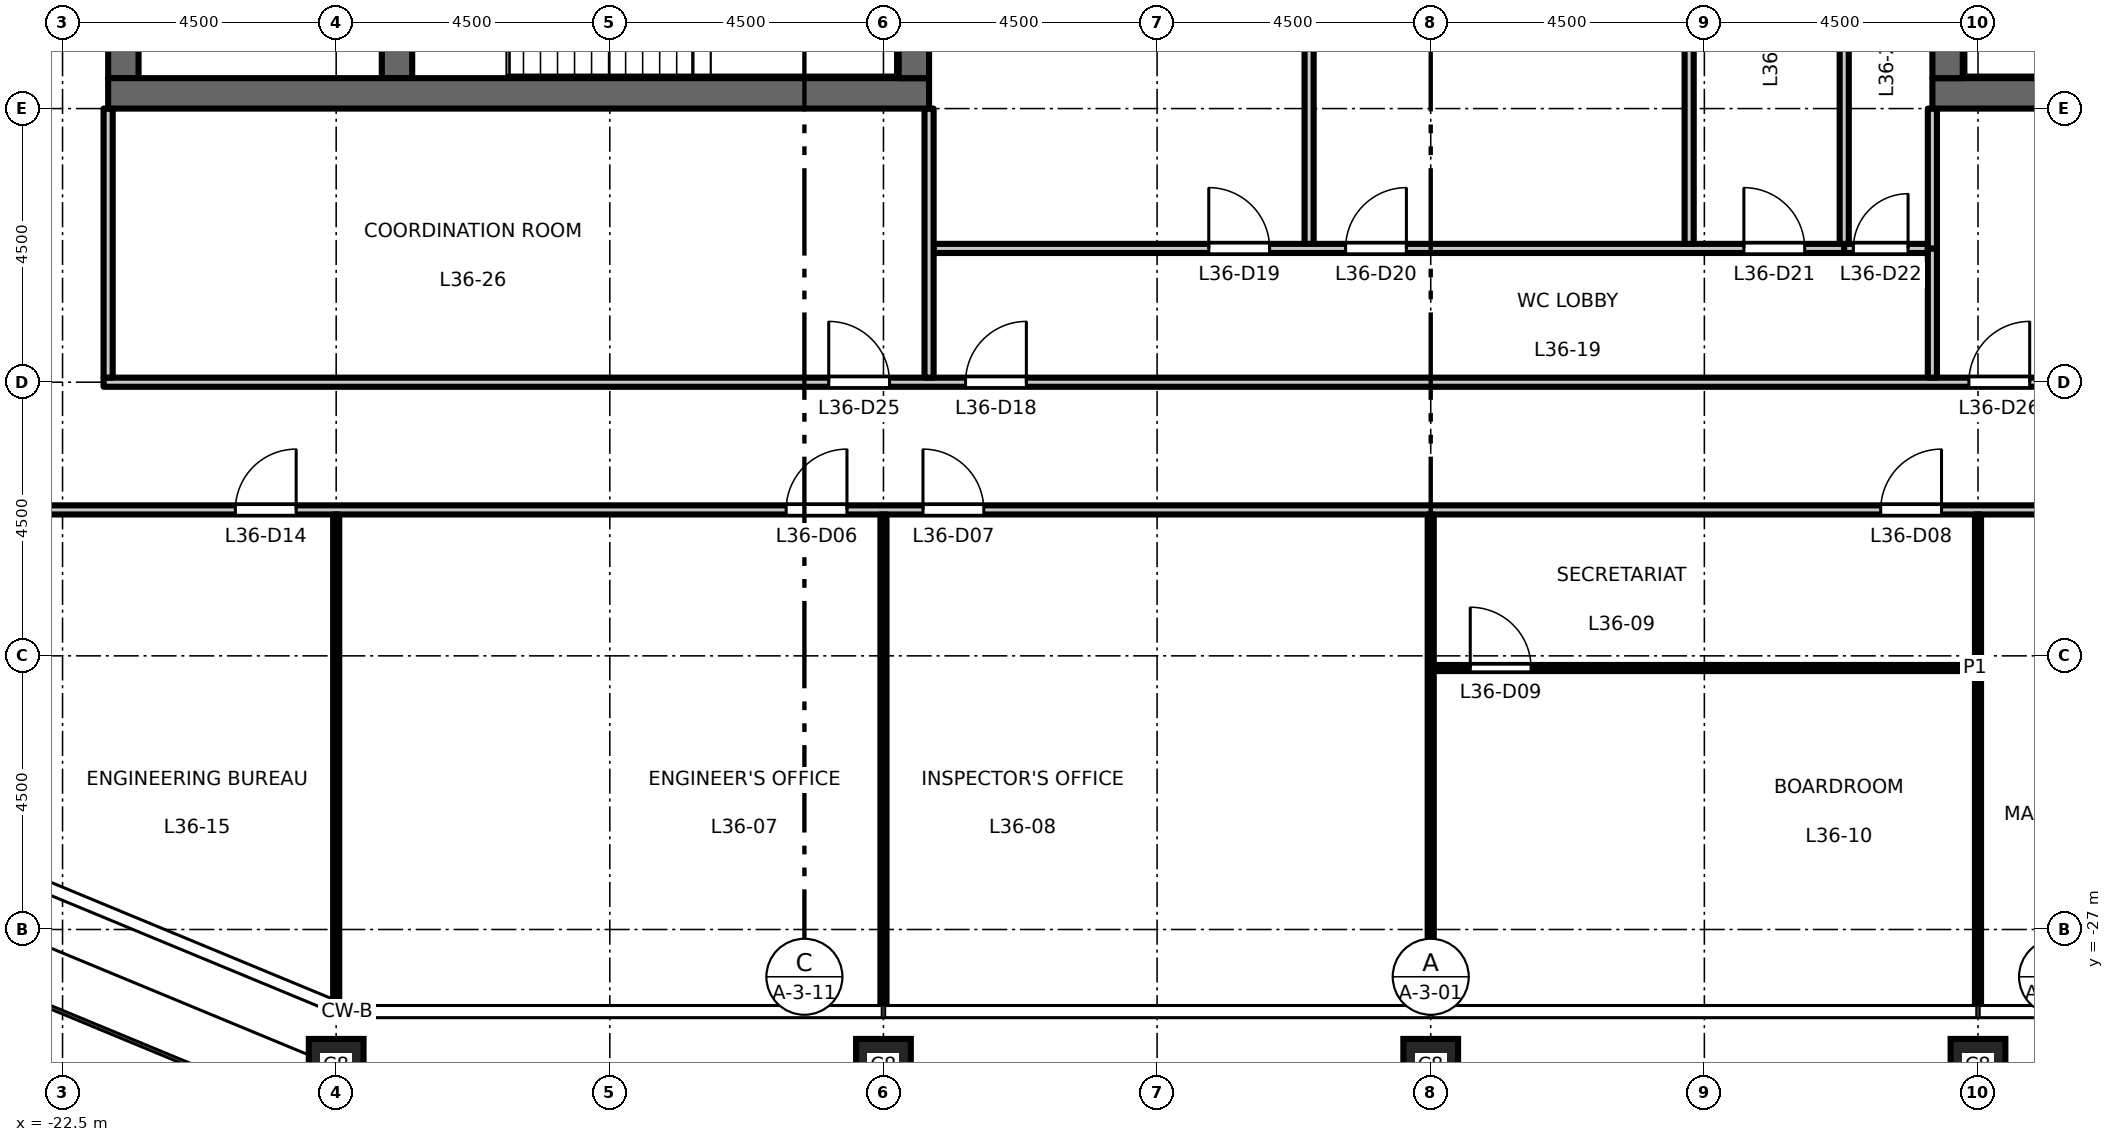
"""IFC4 building model, lengths in metres.
Left out: names, types, materials, properties, quantities, classifications, styles, units other than length and angle.
Written with IfcOpenShell. Run it as: python <this file> out.ifc"""

import sys

from ifc_helpers import new_model, si_unit, direction, frame, frame_2d, origin, origin_2d, place, context, subcontext, project, spatial, rectangle, hollow_rectangle, extrude, element, fill, save


model = new_model("IFC4")
c1 = context("Model", 3, precision=1e-05, world=origin(), true_north=direction((0.0, 1.0)))
c2 = subcontext(c1, "Body", "Model", "MODEL_VIEW")
j1 = project(units=[si_unit("LENGTHUNIT", "METRE"), si_unit("PLANEANGLEUNIT", "RADIAN")], contexts=[c1])
p1 = place(None, origin())
s1 = spatial("IfcSite", under=j1, at=p1, CompositionType="ELEMENT")
p2 = place(p1, origin())
s2 = spatial("IfcBuilding", under=s1, at=p2, CompositionType="ELEMENT")
p3 = place(p2, frame((0.0, 0.0, 167.7)))
s3 = spatial("IfcBuildingStorey", under=s2, at=p3, CompositionType="ELEMENT", Elevation=167.7)
for number, where, z_axis, x_axis in (
    (1, (-18.0, -29.25, 0.0), (0.0, 0.0, 1.0), (1.0, 0.0, 0.0)),
    (2, (-9.0, -29.25, 0.0), (0.0, 0.0, 1.0), (1.0, 0.0, 0.0)),
    (3, (0.0, -29.25, 0.0), (0.0, 0.0, 1.0), (1.0, 0.0, 0.0)),
    (4, (9.0, -29.25, 0.0), (0.0, 0.0, 1.0), (1.0, 0.0, 0.0)),
):
    element("IfcColumn", number, at=place(p3, frame(where, z_axis=z_axis, x_axis=x_axis)), inside=s3, PredefinedType="COLUMN", context=c2, shape_type="SweptSolid", body=[
        extrude(hollow_rectangle(XDim=0.9, YDim=0.9, WallThickness=0.05, at=origin_2d()), origin(), (0.0, 0.0, 1.0), 4.5),
    ])
p4 = place(p3, frame((-21.5, -13.0, 0.0), z_axis=(0.0, 0.0, 1.0), x_axis=(0.0, 1.0, 0.0)))
e5 = element("IfcWall", 5, at=p4, inside=s3, PredefinedType="SHEAR", context=c2, shape_type="SweptSolid", body=[
    extrude(rectangle(XDim=26.0, YDim=0.5, at=frame_2d((13.0, 0.0))), origin(), (0.0, 0.0, 1.0), 4.35),
])
p5 = place(p4, frame((16.825, 0.0, 0.0)))
e6 = element("IfcOpeningElement", 6, at=p5, cuts=e5, PredefinedType="OPENING", context=c2, shape_type="SweptSolid", body=[
    extrude(rectangle(XDim=1.8, YDim=2.1, at=frame_2d((0.9, 1.05))), frame((0.0, 0.26, 0.0), z_axis=(0.0, -1.0, 0.0), x_axis=(1.0, 0.0, 0.0)), (0.0, 0.0, 1.0), 0.52),
])
p6 = place(p4, frame((7.375, 0.0, 0.0)))
e7 = element("IfcOpeningElement", 7, at=p6, cuts=e5, PredefinedType="OPENING", context=c2, shape_type="SweptSolid", body=[
    extrude(rectangle(XDim=1.8, YDim=2.1, at=frame_2d((0.9, 1.05))), frame((0.0, 0.26, 0.0), z_axis=(0.0, -1.0, 0.0), x_axis=(1.0, 0.0, 0.0)), (0.0, 0.0, 1.0), 0.52),
])
p7 = place(p4, frame((2.65, 0.0, 0.0)))
e8 = element("IfcOpeningElement", 8, at=p7, cuts=e5, PredefinedType="OPENING", context=c2, shape_type="SweptSolid", body=[
    extrude(rectangle(XDim=0.9, YDim=2.1, at=frame_2d((0.45, 1.05))), frame((0.0, 0.26, 0.0), z_axis=(0.0, -1.0, 0.0), x_axis=(1.0, 0.0, 0.0)), (0.0, 0.0, 1.0), 0.52),
])
p8 = place(p3, frame((-17.0, -13.0, 0.0), z_axis=(0.0, 0.0, 1.0), x_axis=(0.0, 1.0, 0.0)))
e9 = element("IfcWall", 9, at=p8, inside=s3, PredefinedType="SHEAR", context=c2, shape_type="SweptSolid", body=[
    extrude(rectangle(XDim=6.575, YDim=0.5, at=frame_2d((3.288, 0.0))), origin(), (0.0, 0.0, 1.0), 4.35),
])
p9 = place(p3, frame((-8.25, -13.25, 0.0), z_axis=(0.0, 0.0, 1.0), x_axis=(-1.0, 0.0, 0.0)))
e10 = element("IfcWall", 10, at=p9, inside=s3, PredefinedType="SHEAR", context=c2, shape_type="SweptSolid", body=[
    extrude(rectangle(XDim=13.5, YDim=0.5, at=frame_2d((6.75, 0.0))), origin(), (0.0, 0.0, 1.0), 4.35),
])
p10 = place(p3, frame((-8.5, -13.0, 0.0), z_axis=(0.0, 0.0, 1.0), x_axis=(0.0, 1.0, 0.0)))
e11 = element("IfcWall", 11, at=p10, inside=s3, PredefinedType="SHEAR", context=c2, shape_type="SweptSolid", body=[
    extrude(rectangle(XDim=26.0, YDim=0.5, at=frame_2d((13.0, 0.0))), origin(), (0.0, 0.0, 1.0), 4.35),
])
p11 = place(p3, frame((8.25, -13.25, 0.0), z_axis=(0.0, 0.0, 1.0), x_axis=(1.0, 0.0, 0.0)))
e12 = element("IfcWall", 12, at=p11, inside=s3, PredefinedType="SHEAR", context=c2, shape_type="SweptSolid", body=[
    extrude(rectangle(XDim=13.5, YDim=0.5, at=frame_2d((6.75, 0.0))), origin(), (0.0, 0.0, 1.0), 4.35),
])
p12 = place(p3, frame((8.5, -13.0, 0.0), z_axis=(0.0, 0.0, 1.0), x_axis=(0.0, 1.0, 0.0)))
e13 = element("IfcWall", 13, at=p12, inside=s3, PredefinedType="SHEAR", context=c2, shape_type="SweptSolid", body=[
    extrude(rectangle(XDim=26.0, YDim=0.5, at=frame_2d((13.0, 0.0))), origin(), (0.0, 0.0, 1.0), 4.35),
])
p13 = place(p3, frame((0.05, -22.7, 0.0), z_axis=(0.0, 0.0, 1.0), x_axis=(1.0, 0.0, 0.0)))
e14 = element("IfcWall", 14, at=p13, inside=s3, PredefinedType="PARTITIONING", context=c2, shape_type="SweptSolid", body=[
    extrude(rectangle(XDim=8.9, YDim=0.1, at=frame_2d((4.45, 0.0))), origin(), (0.0, 0.0, 1.0), 4.35),
])
p14 = place(p13, frame((0.6, 0.0, 0.0)))
e15 = element("IfcOpeningElement", 15, at=p14, cuts=e14, PredefinedType="OPENING", context=c2, shape_type="SweptSolid", body=[
    extrude(rectangle(XDim=1.0, YDim=2.1, at=frame_2d((0.5, 1.05))), frame((0.0, 0.06, 0.0), z_axis=(0.0, -1.0, 0.0), x_axis=(1.0, 0.0, 0.0)), (0.0, 0.0, 1.0), 0.12),
])
p15 = place(p3, frame((-27.308, -20.1, 0.0), z_axis=(0.0, 0.0, 1.0), x_axis=(1.0, 0.0, 0.0)))
e16 = element("IfcWall", 16, at=p15, inside=s3, PredefinedType="PARTITIONING", context=c2, shape_type="SweptSolid", body=[
    extrude(rectangle(XDim=54.616, YDim=0.15, at=frame_2d((27.308, 0.0))), origin(), (0.0, 0.0, 1.0), 4.35),
])
p16 = place(p15, frame((16.708, 0.0, 0.0)))
e17 = element("IfcOpeningElement", 17, at=p16, cuts=e16, PredefinedType="OPENING", context=c2, shape_type="SweptSolid", body=[
    extrude(rectangle(XDim=1.0, YDim=2.1, at=frame_2d((0.5, 1.05))), frame((0.0, 0.085, 0.0), z_axis=(0.0, -1.0, 0.0), x_axis=(1.0, 0.0, 0.0)), (0.0, 0.0, 1.0), 0.17),
])
p17 = place(p15, frame((18.958, 0.0, 0.0)))
e18 = element("IfcOpeningElement", 18, at=p17, cuts=e16, PredefinedType="OPENING", context=c2, shape_type="SweptSolid", body=[
    extrude(rectangle(XDim=1.0, YDim=2.1, at=frame_2d((0.5, 1.05))), frame((0.0, 0.085, 0.0), z_axis=(0.0, -1.0, 0.0), x_axis=(1.0, 0.0, 0.0)), (0.0, 0.0, 1.0), 0.17),
])
p18 = place(p15, frame((34.708, 0.0, 0.0)))
e19 = element("IfcOpeningElement", 19, at=p18, cuts=e16, PredefinedType="OPENING", context=c2, shape_type="SweptSolid", body=[
    extrude(rectangle(XDim=1.0, YDim=2.1, at=frame_2d((0.5, 1.05))), frame((0.0, 0.085, 0.0), z_axis=(0.0, -1.0, 0.0), x_axis=(1.0, 0.0, 0.0)), (0.0, 0.0, 1.0), 0.17),
])
p19 = place(p15, frame((43.708, 0.0, 0.0)))
e20 = element("IfcOpeningElement", 20, at=p19, cuts=e16, PredefinedType="OPENING", context=c2, shape_type="SweptSolid", body=[
    extrude(rectangle(XDim=1.0, YDim=2.1, at=frame_2d((0.5, 1.05))), frame((0.0, 0.085, 0.0), z_axis=(0.0, -1.0, 0.0), x_axis=(1.0, 0.0, 0.0)), (0.0, 0.0, 1.0), 0.17),
])
p20 = place(p15, frame((7.65, 0.0, 0.0)))
e21 = element("IfcOpeningElement", 21, at=p20, cuts=e16, PredefinedType="OPENING", context=c2, shape_type="SweptSolid", body=[
    extrude(rectangle(XDim=1.0, YDim=2.1, at=frame_2d((0.5, 1.05))), frame((0.0, 0.085, 0.0), z_axis=(0.0, -1.0, 0.0), x_axis=(1.0, 0.0, 0.0)), (0.0, 0.0, 1.0), 0.17),
])
p21 = place(p15, frame((45.958, 0.0, 0.0)))
e22 = element("IfcOpeningElement", 22, at=p21, cuts=e16, PredefinedType="OPENING", context=c2, shape_type="SweptSolid", body=[
    extrude(rectangle(XDim=1.0, YDim=2.1, at=frame_2d((0.5, 1.05))), frame((0.0, 0.085, 0.0), z_axis=(0.0, -1.0, 0.0), x_axis=(1.0, 0.0, 0.0)), (0.0, 0.0, 1.0), 0.17),
])
p22 = place(p3, frame((-21.825, -18.0, 0.0), z_axis=(0.0, 0.0, 1.0), x_axis=(1.0, 0.0, 0.0)))
e23 = element("IfcWall", 23, at=p22, inside=s3, PredefinedType="PARTITIONING", context=c2, shape_type="SweptSolid", body=[
    extrude(rectangle(XDim=43.65, YDim=0.15, at=frame_2d((21.825, 0.0))), origin(), (0.0, 0.0, 1.0), 4.35),
])
p23 = place(p22, frame((14.175, 0.0, 0.0)))
e24 = element("IfcOpeningElement", 24, at=p23, cuts=e23, PredefinedType="OPENING", context=c2, shape_type="SweptSolid", body=[
    extrude(rectangle(XDim=1.0, YDim=2.1, at=frame_2d((0.5, 1.05))), frame((0.0, 0.085, 0.0), z_axis=(0.0, -1.0, 0.0), x_axis=(1.0, 0.0, 0.0)), (0.0, 0.0, 1.0), 0.17),
])
p24 = place(p22, frame((11.925, 0.0, 0.0)))
e25 = element("IfcOpeningElement", 25, at=p24, cuts=e23, PredefinedType="OPENING", context=c2, shape_type="SweptSolid", body=[
    extrude(rectangle(XDim=1.0, YDim=2.1, at=frame_2d((0.5, 1.05))), frame((0.0, 0.085, 0.0), z_axis=(0.0, -1.0, 0.0), x_axis=(1.0, 0.0, 0.0)), (0.0, 0.0, 1.0), 0.17),
])
p25 = place(p22, frame((30.675, 0.0, 0.0)))
e26 = element("IfcOpeningElement", 26, at=p25, cuts=e23, PredefinedType="OPENING", context=c2, shape_type="SweptSolid", body=[
    extrude(rectangle(XDim=1.0, YDim=2.1, at=frame_2d((0.5, 1.05))), frame((0.0, 0.085, 0.0), z_axis=(0.0, -1.0, 0.0), x_axis=(1.0, 0.0, 0.0)), (0.0, 0.0, 1.0), 0.17),
])
p26 = place(p3, frame((-8.175, -15.8, 0.0), z_axis=(0.0, 0.0, 1.0), x_axis=(1.0, 0.0, 0.0)))
e27 = element("IfcWall", 27, at=p26, inside=s3, PredefinedType="PARTITIONING", context=c2, shape_type="SweptSolid", body=[
    extrude(rectangle(XDim=14.975, YDim=0.15, at=frame_2d((7.488, 0.0))), origin(), (0.0, 0.0, 1.0), 4.35),
])
p27 = place(p26, frame((4.525, 0.0, 0.0)))
e28 = element("IfcOpeningElement", 28, at=p27, cuts=e27, PredefinedType="OPENING", context=c2, shape_type="SweptSolid", body=[
    extrude(rectangle(XDim=1.0, YDim=2.1, at=frame_2d((0.5, 1.05))), frame((0.0, 0.085, 0.0), z_axis=(0.0, -1.0, 0.0), x_axis=(1.0, 0.0, 0.0)), (0.0, 0.0, 1.0), 0.17),
])
p28 = place(p26, frame((6.775, 0.0, 0.0)))
e29 = element("IfcOpeningElement", 29, at=p28, cuts=e27, PredefinedType="OPENING", context=c2, shape_type="SweptSolid", body=[
    extrude(rectangle(XDim=1.0, YDim=2.1, at=frame_2d((0.5, 1.05))), frame((0.0, 0.085, 0.0), z_axis=(0.0, -1.0, 0.0), x_axis=(1.0, 0.0, 0.0)), (0.0, 0.0, 1.0), 0.17),
])
p29 = place(p26, frame((13.325, 0.0, 0.0)))
e30 = element("IfcOpeningElement", 30, at=p29, cuts=e27, PredefinedType="OPENING", context=c2, shape_type="SweptSolid", body=[
    extrude(rectangle(XDim=1.0, YDim=2.1, at=frame_2d((0.5, 1.05))), frame((0.0, 0.085, 0.0), z_axis=(0.0, -1.0, 0.0), x_axis=(1.0, 0.0, 0.0)), (0.0, 0.0, 1.0), 0.17),
])
p30 = place(p3, frame((6.8, -15.8, 0.0), z_axis=(0.0, 0.0, 1.0), x_axis=(1.0, 0.0, 0.0)))
e31 = element("IfcWall", 31, at=p30, inside=s3, PredefinedType="PARTITIONING", context=c2, shape_type="SweptSolid", body=[
    extrude(rectangle(XDim=1.375, YDim=0.15, at=frame_2d((0.688, 0.0))), origin(), (0.0, 0.0, 1.0), 4.35),
])
p31 = place(p30, frame((0.15, 0.0, 0.0)))
e32 = element("IfcOpeningElement", 32, at=p31, cuts=e31, PredefinedType="OPENING", context=c2, shape_type="SweptSolid", body=[
    extrude(rectangle(XDim=0.9, YDim=2.1, at=frame_2d((0.45, 1.05))), frame((0.0, 0.085, 0.0), z_axis=(0.0, -1.0, 0.0), x_axis=(1.0, 0.0, 0.0)), (0.0, 0.0, 1.0), 0.17),
])
p32 = place(p3, frame((-21.75, -17.925, 0.0), z_axis=(0.0, 0.0, 1.0), x_axis=(0.0, 1.0, 0.0)))
e33 = element("IfcWall", 33, at=p32, inside=s3, PredefinedType="PARTITIONING", context=c2, shape_type="SweptSolid", body=[
    extrude(rectangle(XDim=4.425, YDim=0.15, at=frame_2d((2.212, 0.0))), origin(), (0.0, 0.0, 1.0), 4.35),
])
p33 = place(p3, frame((-18.0, -28.178, 0.0), z_axis=(0.0, 0.0, 1.0), x_axis=(0.0, 1.0, 0.0)))
e34 = element("IfcWall", 34, at=p33, inside=s3, PredefinedType="PARTITIONING", context=c2, shape_type="SweptSolid", body=[
    extrude(rectangle(XDim=8.003, YDim=0.1, at=frame_2d((4.001, 0.0))), origin(), (0.0, 0.0, 1.0), 3.45),
])
p34 = place(p3, frame((-9.0, -28.26, 0.0), z_axis=(0.0, 0.0, 1.0), x_axis=(0.0, 1.0, 0.0)))
e35 = element("IfcWall", 35, at=p34, inside=s3, PredefinedType="PARTITIONING", context=c2, shape_type="SweptSolid", body=[
    extrude(rectangle(XDim=8.085, YDim=0.1, at=frame_2d((4.042, 0.0))), origin(), (0.0, 0.0, 1.0), 3.45),
])
p35 = place(p3, frame((-8.25, -17.925, 0.0), z_axis=(0.0, 0.0, 1.0), x_axis=(0.0, 1.0, 0.0)))
e36 = element("IfcWall", 36, at=p35, inside=s3, PredefinedType="PARTITIONING", context=c2, shape_type="SweptSolid", body=[
    extrude(rectangle(XDim=4.425, YDim=0.15, at=frame_2d((2.212, 0.0))), origin(), (0.0, 0.0, 1.0), 4.35),
])
p36 = place(p3, frame((-2.0, -15.725, 0.0), z_axis=(0.0, 0.0, 1.0), x_axis=(0.0, 1.0, 0.0)))
e37 = element("IfcWall", 37, at=p36, inside=s3, PredefinedType="PARTITIONING", context=c2, shape_type="SweptSolid", body=[
    extrude(rectangle(XDim=7.355, YDim=0.15, at=frame_2d((3.677, 0.0))), origin(), (0.0, 0.0, 1.0), 4.35),
])
p37 = place(p3, frame((0.0, -28.26, 0.0), z_axis=(0.0, 0.0, 1.0), x_axis=(0.0, 1.0, 0.0)))
e38 = element("IfcWall", 38, at=p37, inside=s3, PredefinedType="PARTITIONING", context=c2, shape_type="SweptSolid", body=[
    extrude(rectangle(XDim=8.085, YDim=0.1, at=frame_2d((4.042, 0.0))), origin(), (0.0, 0.0, 1.0), 3.45),
])
p38 = place(p3, frame((4.25, -15.725, 0.0), z_axis=(0.0, 0.0, 1.0), x_axis=(0.0, 1.0, 0.0)))
e39 = element("IfcWall", 39, at=p38, inside=s3, PredefinedType="PARTITIONING", context=c2, shape_type="SweptSolid", body=[
    extrude(rectangle(XDim=7.355, YDim=0.15, at=frame_2d((3.677, 0.0))), origin(), (0.0, 0.0, 1.0), 4.35),
])
p39 = place(p3, frame((6.8, -15.725, 0.0), z_axis=(0.0, 0.0, 1.0), x_axis=(0.0, 1.0, 0.0)))
e40 = element("IfcWall", 40, at=p39, inside=s3, PredefinedType="PARTITIONING", context=c2, shape_type="SweptSolid", body=[
    extrude(rectangle(XDim=7.656, YDim=0.15, at=frame_2d((3.828, 0.0))), origin(), (0.0, 0.0, 1.0), 4.35),
])
p40 = place(p3, frame((8.25, -17.925, 0.0), z_axis=(0.0, 0.0, 1.0), x_axis=(0.0, 1.0, 0.0)))
e41 = element("IfcWall", 41, at=p40, inside=s3, PredefinedType="PARTITIONING", context=c2, shape_type="SweptSolid", body=[
    extrude(rectangle(XDim=2.125, YDim=0.15, at=frame_2d((1.062, 0.0))), origin(), (0.0, 0.0, 1.0), 4.35),
])
p41 = place(p3, frame((8.25, -15.8, 0.0), z_axis=(0.0, 0.0, 1.0), x_axis=(0.0, 1.0, 0.0)))
e42 = element("IfcWall", 42, at=p41, inside=s3, PredefinedType="PARTITIONING", context=c2, shape_type="SweptSolid", body=[
    extrude(rectangle(XDim=2.3, YDim=0.15, at=frame_2d((1.15, 0.0))), origin(), (0.0, 0.0, 1.0), 4.35),
])
p42 = place(p3, frame((9.0, -28.26, 0.0), z_axis=(0.0, 0.0, 1.0), x_axis=(0.0, 1.0, 0.0)))
e43 = element("IfcWall", 43, at=p42, inside=s3, PredefinedType="PARTITIONING", context=c2, shape_type="SweptSolid", body=[
    extrude(rectangle(XDim=8.085, YDim=0.1, at=frame_2d((4.042, 0.0))), origin(), (0.0, 0.0, 1.0), 3.45),
])
p43 = place(p16, origin())
e44 = element("IfcDoor", 44, at=p43, inside=s3, OperationType="SINGLE_SWING_RIGHT", PredefinedType="DOOR", context=c2, shape_type="SweptSolid", body=[
    extrude(rectangle(XDim=1.0, YDim=2.1, at=frame_2d((0.5, 1.05))), frame((0.0, 0.025, 0.0), z_axis=(0.0, -1.0, 0.0), x_axis=(1.0, 0.0, 0.0)), (0.0, 0.0, 1.0), 0.05),
])
fill(e17, e44)
p44 = place(p17, origin())
e45 = element("IfcDoor", 45, at=p44, inside=s3, OperationType="SINGLE_SWING_LEFT", PredefinedType="DOOR", context=c2, shape_type="SweptSolid", body=[
    extrude(rectangle(XDim=1.0, YDim=2.1, at=frame_2d((0.5, 1.05))), frame((0.0, 0.025, 0.0), z_axis=(0.0, -1.0, 0.0), x_axis=(1.0, 0.0, 0.0)), (0.0, 0.0, 1.0), 0.05),
])
fill(e18, e45)
p45 = place(p18, origin())
e46 = element("IfcDoor", 46, at=p45, inside=s3, OperationType="SINGLE_SWING_RIGHT", PredefinedType="DOOR", context=c2, shape_type="SweptSolid", body=[
    extrude(rectangle(XDim=1.0, YDim=2.1, at=frame_2d((0.5, 1.05))), frame((0.0, 0.025, 0.0), z_axis=(0.0, -1.0, 0.0), x_axis=(1.0, 0.0, 0.0)), (0.0, 0.0, 1.0), 0.05),
])
fill(e19, e46)
p46 = place(p14, origin())
e47 = element("IfcDoor", 47, at=p46, inside=s3, OperationType="SINGLE_SWING_LEFT", PredefinedType="DOOR", context=c2, shape_type="SweptSolid", body=[
    extrude(rectangle(XDim=1.0, YDim=2.1, at=frame_2d((0.5, 1.05))), frame((0.0, 0.025, 0.0), z_axis=(0.0, -1.0, 0.0), x_axis=(1.0, 0.0, 0.0)), (0.0, 0.0, 1.0), 0.05),
])
fill(e15, e47)
p47 = place(p20, origin())
e48 = element("IfcDoor", 48, at=p47, inside=s3, OperationType="SINGLE_SWING_RIGHT", PredefinedType="DOOR", context=c2, shape_type="SweptSolid", body=[
    extrude(rectangle(XDim=1.0, YDim=2.1, at=frame_2d((0.5, 1.05))), frame((0.0, 0.025, 0.0), z_axis=(0.0, -1.0, 0.0), x_axis=(1.0, 0.0, 0.0)), (0.0, 0.0, 1.0), 0.05),
])
fill(e21, e48)
p48 = place(p23, origin())
e49 = element("IfcDoor", 49, at=p48, inside=s3, OperationType="SINGLE_SWING_RIGHT", PredefinedType="DOOR", context=c2, shape_type="SweptSolid", body=[
    extrude(rectangle(XDim=1.0, YDim=2.1, at=frame_2d((0.5, 1.05))), frame((0.0, 0.025, 0.0), z_axis=(0.0, -1.0, 0.0), x_axis=(1.0, 0.0, 0.0)), (0.0, 0.0, 1.0), 0.05),
])
fill(e24, e49)
p49 = place(p27, origin())
e50 = element("IfcDoor", 50, at=p49, inside=s3, OperationType="SINGLE_SWING_LEFT", PredefinedType="DOOR", context=c2, shape_type="SweptSolid", body=[
    extrude(rectangle(XDim=1.0, YDim=2.1, at=frame_2d((0.5, 1.05))), frame((0.0, 0.025, 0.0), z_axis=(0.0, -1.0, 0.0), x_axis=(1.0, 0.0, 0.0)), (0.0, 0.0, 1.0), 0.05),
])
fill(e28, e50)
p50 = place(p28, origin())
e51 = element("IfcDoor", 51, at=p50, inside=s3, OperationType="SINGLE_SWING_RIGHT", PredefinedType="DOOR", context=c2, shape_type="SweptSolid", body=[
    extrude(rectangle(XDim=1.0, YDim=2.1, at=frame_2d((0.5, 1.05))), frame((0.0, 0.025, 0.0), z_axis=(0.0, -1.0, 0.0), x_axis=(1.0, 0.0, 0.0)), (0.0, 0.0, 1.0), 0.05),
])
fill(e29, e51)
p51 = place(p29, origin())
e52 = element("IfcDoor", 52, at=p51, inside=s3, OperationType="SINGLE_SWING_LEFT", PredefinedType="DOOR", context=c2, shape_type="SweptSolid", body=[
    extrude(rectangle(XDim=1.0, YDim=2.1, at=frame_2d((0.5, 1.05))), frame((0.0, 0.025, 0.0), z_axis=(0.0, -1.0, 0.0), x_axis=(1.0, 0.0, 0.0)), (0.0, 0.0, 1.0), 0.05),
])
fill(e30, e52)
p52 = place(p31, origin())
e53 = element("IfcDoor", 53, at=p52, inside=s3, OperationType="SINGLE_SWING_RIGHT", PredefinedType="DOOR", context=c2, shape_type="SweptSolid", body=[
    extrude(rectangle(XDim=0.9, YDim=2.1, at=frame_2d((0.45, 1.05))), frame((0.0, 0.025, 0.0), z_axis=(0.0, -1.0, 0.0), x_axis=(1.0, 0.0, 0.0)), (0.0, 0.0, 1.0), 0.05),
])
fill(e32, e53)
p53 = place(p24, origin())
e54 = element("IfcDoor", 54, at=p53, inside=s3, OperationType="SINGLE_SWING_LEFT", PredefinedType="DOOR", context=c2, shape_type="SweptSolid", body=[
    extrude(rectangle(XDim=1.0, YDim=2.1, at=frame_2d((0.5, 1.05))), frame((0.0, 0.025, 0.0), z_axis=(0.0, -1.0, 0.0), x_axis=(1.0, 0.0, 0.0)), (0.0, 0.0, 1.0), 0.05),
])
fill(e25, e54)
p54 = place(p25, origin())
e55 = element("IfcDoor", 55, at=p54, inside=s3, OperationType="SINGLE_SWING_RIGHT", PredefinedType="DOOR", context=c2, shape_type="SweptSolid", body=[
    extrude(rectangle(XDim=1.0, YDim=2.1, at=frame_2d((0.5, 1.05))), frame((0.0, 0.025, 0.0), z_axis=(0.0, -1.0, 0.0), x_axis=(1.0, 0.0, 0.0)), (0.0, 0.0, 1.0), 0.05),
])
fill(e26, e55)
save(model, sys.argv[1])
